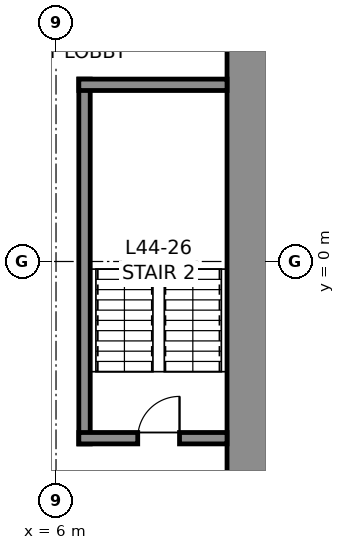
"""IFC4 building model, lengths in metres.
Left out: names, types, materials, properties, quantities, classifications, styles, units other than length and angle.
Written with IfcOpenShell. Run it as: python <this file> out.ifc"""

import sys

from ifc_helpers import new_model, si_unit, direction, frame, frame_2d, origin, place, context, subcontext, project, spatial, rectangle, extrude, element, fill, save


model = new_model("IFC4")
c1 = context("Model", 3, precision=1e-05, world=origin(), true_north=direction((0.0, 1.0)))
c2 = subcontext(c1, "Body", "Model", "MODEL_VIEW")
j1 = project(units=[si_unit("LENGTHUNIT", "METRE"), si_unit("PLANEANGLEUNIT", "RADIAN")], contexts=[c1])
p1 = place(None, origin())
s1 = spatial("IfcSite", under=j1, at=p1, CompositionType="ELEMENT")
p2 = place(p1, origin())
s2 = spatial("IfcBuilding", under=s1, at=p2, CompositionType="ELEMENT")
p3 = place(p2, frame((0.0, 0.0, 205.8)))
s3 = spatial("IfcBuildingStorey", under=s2, at=p3, CompositionType="ELEMENT", Elevation=205.8)
p4 = place(p3, frame((11.25, 10.5, 0.0), z_axis=(0.0, 0.0, 1.0), x_axis=(0.0, -1.0, 0.0)))
e1 = element("IfcWall", 1, at=p4, inside=s3, PredefinedType="SHEAR", context=c2, shape_type="SweptSolid", body=[
    extrude(rectangle(XDim=21.0, YDim=1.5, at=frame_2d((10.5, 0.0))), origin(), (0.0, 0.0, 1.0), 4.0),
])
p5 = place(p4, frame((3.7, 0.0, 0.0)))
e2 = element("IfcOpeningElement", 2, at=p5, cuts=e1, PredefinedType="OPENING", context=c2, shape_type="SweptSolid", body=[
    extrude(rectangle(XDim=1.2, YDim=2.3, at=frame_2d((0.6, 1.15))), frame((0.0, 0.76, 0.0), z_axis=(0.0, -1.0, 0.0), x_axis=(1.0, 0.0, 0.0)), (0.0, 0.0, 1.0), 1.52),
])
p6 = place(p4, frame((16.1, 0.0, 0.0)))
e3 = element("IfcOpeningElement", 3, at=p6, cuts=e1, PredefinedType="OPENING", context=c2, shape_type="SweptSolid", body=[
    extrude(rectangle(XDim=1.2, YDim=2.3, at=frame_2d((0.6, 1.15))), frame((0.0, 0.76, 0.0), z_axis=(0.0, -1.0, 0.0), x_axis=(1.0, 0.0, 0.0)), (0.0, 0.0, 1.0), 1.52),
])
p7 = place(p3, frame((6.75, -4.8, 0.0), z_axis=(0.0, 0.0, 1.0), x_axis=(0.0, 1.0, 0.0)))
e4 = element("IfcWall", 4, at=p7, inside=s3, PredefinedType="SOLIDWALL", context=c2, shape_type="SweptSolid", body=[
    extrude(rectangle(XDim=9.6, YDim=0.3, at=frame_2d((4.8, 0.0))), origin(), (0.0, 0.0, 1.0), 3.75),
])
p8 = place(p3, frame((6.6, 4.65, 0.0), z_axis=(0.0, 0.0, 1.0), x_axis=(1.0, 0.0, 0.0)))
e5 = element("IfcWall", 5, at=p8, inside=s3, PredefinedType="SOLIDWALL", context=c2, shape_type="SweptSolid", body=[
    extrude(rectangle(XDim=3.9, YDim=0.3, at=frame_2d((1.95, 0.0))), origin(), (0.0, 0.0, 1.0), 3.75),
])
p9 = place(p3, frame((10.5, -4.65, 0.0), z_axis=(0.0, 0.0, 1.0), x_axis=(-1.0, 0.0, 0.0)))
e6 = element("IfcWall", 6, at=p9, inside=s3, PredefinedType="SOLIDWALL", context=c2, shape_type="SweptSolid", body=[
    extrude(rectangle(XDim=3.9, YDim=0.3, at=frame_2d((1.95, 0.0))), origin(), (0.0, 0.0, 1.0), 3.75),
])
p10 = place(p9, frame((1.25, 0.0, 0.0)))
e7 = element("IfcOpeningElement", 7, at=p10, cuts=e6, PredefinedType="OPENING", context=c2, shape_type="SweptSolid", body=[
    extrude(rectangle(XDim=1.1, YDim=2.3, at=frame_2d((0.55, 1.15))), frame((0.0, 0.16, 0.0), z_axis=(0.0, -1.0, 0.0), x_axis=(1.0, 0.0, 0.0)), (0.0, 0.0, 1.0), 0.32),
])
p11 = place(p10, frame((1.1, 0.0, 0.0), z_axis=(0.0, 0.0, 1.0), x_axis=(-1.0, 0.0, 0.0)))
e8 = element("IfcDoor", 8, at=p11, inside=s3, OperationType="SINGLE_SWING_RIGHT", PredefinedType="DOOR", context=c2, shape_type="SweptSolid", body=[
    extrude(rectangle(XDim=1.1, YDim=2.3, at=frame_2d((0.55, 1.15))), frame((0.0, 0.025, 0.0), z_axis=(0.0, -1.0, 0.0), x_axis=(1.0, 0.0, 0.0)), (0.0, 0.0, 1.0), 0.05),
])
fill(e7, e8)
save(model, sys.argv[1])
